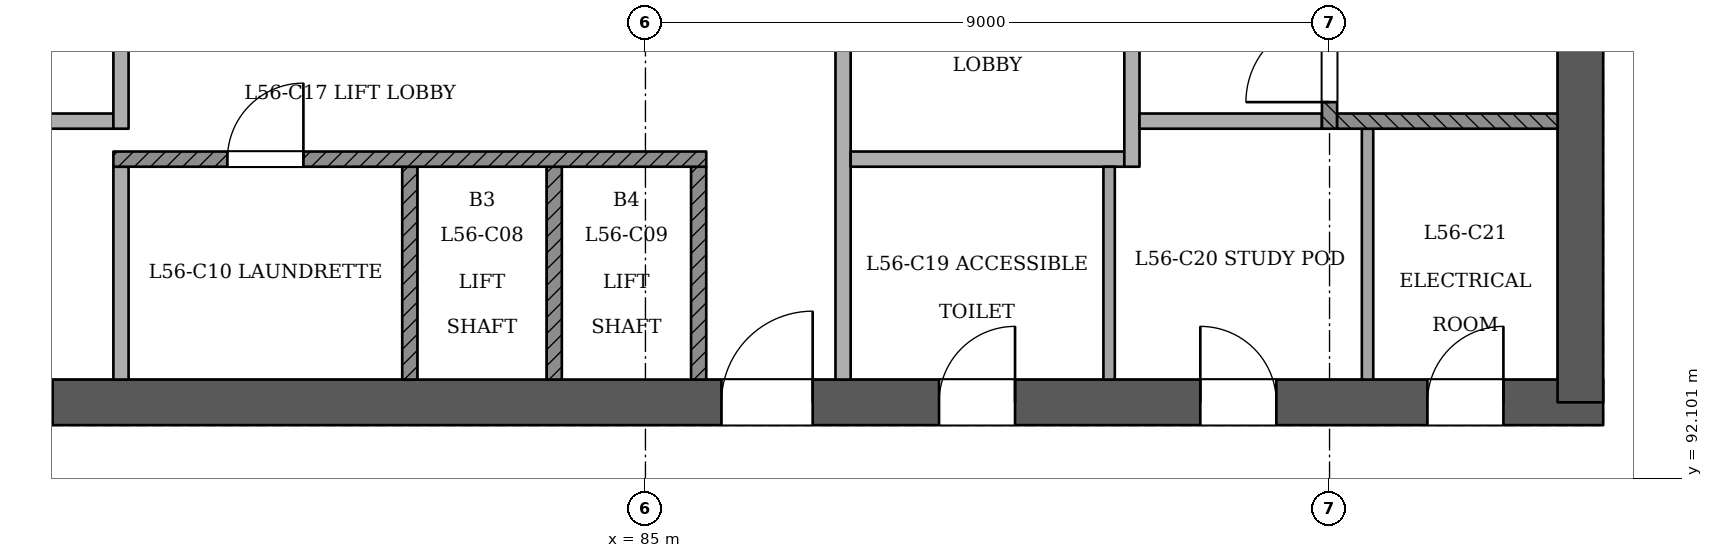
"""IFC4 building model, lengths in metres.
Left out: names, types, materials, properties, quantities, classifications, styles, units other than length and angle.
Written with IfcOpenShell. Run it as: python <this file> out.ifc"""

import sys

from ifc_helpers import new_model, si_unit, direction, frame, frame_2d, origin, place, context, subcontext, project, spatial, rectangle, extrude, element, fill, save


model = new_model("IFC4")
c1 = context("Model", 3, precision=1e-05, world=origin(), true_north=direction((0.0, 1.0)))
c2 = subcontext(c1, "Body", "Model", "MODEL_VIEW")
j1 = project(units=[si_unit("LENGTHUNIT", "METRE"), si_unit("PLANEANGLEUNIT", "RADIAN")], contexts=[c1])
p1 = place(None, origin())
s1 = spatial("IfcSite", under=j1, at=p1, CompositionType="ELEMENT")
p2 = place(p1, origin())
s2 = spatial("IfcBuilding", under=s1, at=p2, CompositionType="ELEMENT")
p3 = place(p2, frame((0.0, 0.0, 219.4)))
s3 = spatial("IfcBuildingStorey", under=s2, at=p3, CompositionType="ELEMENT", Elevation=219.4)
p4 = place(p3, frame((72.7, 93.1, 0.0), z_axis=(0.0, 0.0, 1.0), x_axis=(1.0, 0.0, 0.0)))
e1 = element("IfcWall", 1, at=p4, inside=s3, PredefinedType="SHEAR", context=c2, shape_type="SweptSolid", body=[
    extrude(rectangle(XDim=24.9, YDim=0.6, at=frame_2d((12.45, 0.0))), origin(), (0.0, 0.0, 1.0), 3.6),
])
p5 = place(p4, frame((1.1, 0.0, 0.0)))
e2 = element("IfcOpeningElement", 2, at=p5, cuts=e1, PredefinedType="OPENING", context=c2, shape_type="SweptSolid", body=[
    extrude(rectangle(XDim=1.2, YDim=2.1, at=frame_2d((0.6, 1.05))), frame((0.0, 0.311, 0.0), z_axis=(0.0, -1.0, 0.0), x_axis=(1.0, 0.0, 0.0)), (0.0, 0.0, 1.0), 0.621),
])
p6 = place(p4, frame((3.3, 0.0, 0.0)))
e3 = element("IfcOpeningElement", 3, at=p6, cuts=e1, PredefinedType="OPENING", context=c2, shape_type="SweptSolid", body=[
    extrude(rectangle(XDim=1.2, YDim=2.1, at=frame_2d((0.6, 1.05))), frame((0.0, 0.311, 0.0), z_axis=(0.0, -1.0, 0.0), x_axis=(1.0, 0.0, 0.0)), (0.0, 0.0, 1.0), 0.621),
])
p7 = place(p4, frame((13.3, 0.0, 0.0)))
e4 = element("IfcOpeningElement", 4, at=p7, cuts=e1, PredefinedType="OPENING", context=c2, shape_type="SweptSolid", body=[
    extrude(rectangle(XDim=1.2, YDim=2.1, at=frame_2d((0.6, 1.05))), frame((0.0, 0.311, 0.0), z_axis=(0.0, -1.0, 0.0), x_axis=(1.0, 0.0, 0.0)), (0.0, 0.0, 1.0), 0.621),
])
p8 = place(p4, frame((16.163, 0.0, 0.0)))
e5 = element("IfcOpeningElement", 5, at=p8, cuts=e1, PredefinedType="OPENING", context=c2, shape_type="SweptSolid", body=[
    extrude(rectangle(XDim=1.0, YDim=2.1, at=frame_2d((0.5, 1.05))), frame((0.0, 0.311, 0.0), z_axis=(0.0, -1.0, 0.0), x_axis=(1.0, 0.0, 0.0)), (0.0, 0.0, 1.0), 0.621),
])
p9 = place(p4, frame((19.6, 0.0, 0.0)))
e6 = element("IfcOpeningElement", 6, at=p9, cuts=e1, PredefinedType="OPENING", context=c2, shape_type="SweptSolid", body=[
    extrude(rectangle(XDim=1.0, YDim=2.1, at=frame_2d((0.5, 1.05))), frame((0.0, 0.311, 0.0), z_axis=(0.0, -1.0, 0.0), x_axis=(1.0, 0.0, 0.0)), (0.0, 0.0, 1.0), 0.621),
])
p10 = place(p4, frame((22.587, 0.0, 0.0)))
e7 = element("IfcOpeningElement", 7, at=p10, cuts=e1, PredefinedType="OPENING", context=c2, shape_type="SweptSolid", body=[
    extrude(rectangle(XDim=1.0, YDim=2.1, at=frame_2d((0.5, 1.05))), frame((0.0, 0.311, 0.0), z_axis=(0.0, -1.0, 0.0), x_axis=(1.0, 0.0, 0.0)), (0.0, 0.0, 1.0), 0.621),
])
p11 = place(p3, frame((97.3, 93.1, 0.0), z_axis=(0.0, 0.0, 1.0), x_axis=(0.0, 1.0, 0.0)))
e8 = element("IfcWall", 8, at=p11, inside=s3, PredefinedType="SHEAR", context=c2, shape_type="SweptSolid", body=[
    extrude(rectangle(XDim=10.9, YDim=0.6, at=frame_2d((5.45, 0.0))), origin(), (0.0, 0.0, 1.0), 3.6),
])
p12 = place(p3, frame((78.1, 93.4, 0.0), z_axis=(0.0, 0.0, 1.0), x_axis=(0.0, 1.0, 0.0)))
e9 = element("IfcWall", 9, at=p12, inside=s3, PredefinedType="PARTITIONING", context=c2, shape_type="SweptSolid", body=[
    extrude(rectangle(XDim=2.8, YDim=0.2, at=frame_2d((1.4, 0.0))), origin(), (0.0, 0.0, 1.0), 3.2),
])
for number, where, z_axis, x_axis in (
    (10, (81.9, 93.4, 0.0), (0.0, 0.0, 1.0), (0.0, 1.0, 0.0)),
    (11, (83.8, 93.4, 0.0), (0.0, 0.0, 1.0), (0.0, 1.0, 0.0)),
    (12, (85.7, 93.4, 0.0), (0.0, 0.0, 1.0), (0.0, 1.0, 0.0)),
):
    element("IfcWall", number, at=place(p3, frame(where, z_axis=z_axis, x_axis=x_axis)), inside=s3, PredefinedType="SOLIDWALL", context=c2, shape_type="SweptSolid", body=[
        extrude(rectangle(XDim=2.8, YDim=0.2, at=frame_2d((1.4, 0.0))), origin(), (0.0, 0.0, 1.0), 3.2),
    ])
p13 = place(p3, frame((87.6, 93.4, 0.0), z_axis=(0.0, 0.0, 1.0), x_axis=(0.0, 1.0, 0.0)))
e13 = element("IfcWall", 13, at=p13, inside=s3, PredefinedType="PARTITIONING", context=c2, shape_type="SweptSolid", body=[
    extrude(rectangle(XDim=7.0, YDim=0.2, at=frame_2d((3.5, 0.0))), origin(), (0.0, 0.0, 1.0), 3.2),
])
p14 = place(p13, frame((4.45, 0.0, 0.0)))
e14 = element("IfcOpeningElement", 14, at=p14, cuts=e13, PredefinedType="OPENING", context=c2, shape_type="SweptSolid", body=[
    extrude(rectangle(XDim=1.1, YDim=2.1, at=frame_2d((0.55, 1.05))), frame((0.0, 0.11, 0.0), z_axis=(0.0, -1.0, 0.0), x_axis=(1.0, 0.0, 0.0)), (0.0, 0.0, 1.0), 0.221),
])
p15 = place(p3, frame((91.1, 93.4, 0.0), z_axis=(0.0, 0.0, 1.0), x_axis=(0.0, 1.0, 0.0)))
e15 = element("IfcWall", 15, at=p15, inside=s3, PredefinedType="PARTITIONING", context=c2, shape_type="SweptSolid", body=[
    extrude(rectangle(XDim=2.8, YDim=0.15, at=frame_2d((1.4, 0.0))), origin(), (0.0, 0.0, 1.0), 3.2),
])
p16 = place(p3, frame((94.5, 93.4, 0.0), z_axis=(0.0, 0.0, 1.0), x_axis=(0.0, 1.0, 0.0)))
e16 = element("IfcWall", 16, at=p16, inside=s3, PredefinedType="PARTITIONING", context=c2, shape_type="SweptSolid", body=[
    extrude(rectangle(XDim=3.3, YDim=0.15, at=frame_2d((1.65, 0.0))), origin(), (0.0, 0.0, 1.0), 3.2),
])
p17 = place(p3, frame((78.0, 96.3, 0.0), z_axis=(0.0, 0.0, 1.0), x_axis=(1.0, 0.0, 0.0)))
e17 = element("IfcWall", 17, at=p17, inside=s3, PredefinedType="SOLIDWALL", context=c2, shape_type="SweptSolid", body=[
    extrude(rectangle(XDim=7.8, YDim=0.2, at=frame_2d((3.9, 0.0))), origin(), (0.0, 0.0, 1.0), 3.2),
])
p18 = place(p17, frame((1.5, 0.0, 0.0)))
e18 = element("IfcOpeningElement", 18, at=p18, cuts=e17, PredefinedType="OPENING", context=c2, shape_type="SweptSolid", body=[
    extrude(rectangle(XDim=1.0, YDim=2.1, at=frame_2d((0.5, 1.05))), frame((0.0, 0.11, 0.0), z_axis=(0.0, -1.0, 0.0), x_axis=(1.0, 0.0, 0.0)), (0.0, 0.0, 1.0), 0.221),
])
p19 = place(p3, frame((87.7, 96.3, 0.0), z_axis=(0.0, 0.0, 1.0), x_axis=(1.0, 0.0, 0.0)))
e19 = element("IfcWall", 19, at=p19, inside=s3, PredefinedType="PARTITIONING", context=c2, shape_type="SweptSolid", body=[
    extrude(rectangle(XDim=3.6, YDim=0.2, at=frame_2d((1.8, 0.0))), origin(), (0.0, 0.0, 1.0), 3.2),
])
p20 = place(p3, frame((91.4, 96.2, 0.0), z_axis=(0.0, 0.0, 1.0), x_axis=(0.0, 1.0, 0.0)))
e20 = element("IfcWall", 20, at=p20, inside=s3, PredefinedType="PARTITIONING", context=c2, shape_type="SweptSolid", body=[
    extrude(rectangle(XDim=4.2, YDim=0.2, at=frame_2d((2.1, 0.0))), origin(), (0.0, 0.0, 1.0), 3.2),
])
p21 = place(p20, frame((2.45, 0.0, 0.0)))
e21 = element("IfcOpeningElement", 21, at=p21, cuts=e20, PredefinedType="OPENING", context=c2, shape_type="SweptSolid", body=[
    extrude(rectangle(XDim=1.1, YDim=2.1, at=frame_2d((0.55, 1.05))), frame((0.0, 0.11, 0.0), z_axis=(0.0, -1.0, 0.0), x_axis=(1.0, 0.0, 0.0)), (0.0, 0.0, 1.0), 0.221),
])
p22 = place(p3, frame((76.1, 96.8, 0.0), z_axis=(0.0, 0.0, 1.0), x_axis=(1.0, 0.0, 0.0)))
e22 = element("IfcWall", 22, at=p22, inside=s3, PredefinedType="PARTITIONING", context=c2, shape_type="SweptSolid", body=[
    extrude(rectangle(XDim=1.9, YDim=0.2, at=frame_2d((0.95, 0.0))), origin(), (0.0, 0.0, 1.0), 3.2),
])
p23 = place(p3, frame((78.1, 96.7, 0.0), z_axis=(0.0, 0.0, 1.0), x_axis=(0.0, 1.0, 0.0)))
e23 = element("IfcWall", 23, at=p23, inside=s3, PredefinedType="PARTITIONING", context=c2, shape_type="SweptSolid", body=[
    extrude(rectangle(XDim=3.7, YDim=0.2, at=frame_2d((1.85, 0.0))), origin(), (0.0, 0.0, 1.0), 3.2),
])
p24 = place(p23, frame((1.95, 0.0, 0.0)))
e24 = element("IfcOpeningElement", 24, at=p24, cuts=e23, PredefinedType="OPENING", context=c2, shape_type="SweptSolid", body=[
    extrude(rectangle(XDim=1.1, YDim=2.1, at=frame_2d((0.55, 1.05))), frame((0.0, 0.11, 0.0), z_axis=(0.0, -1.0, 0.0), x_axis=(1.0, 0.0, 0.0)), (0.0, 0.0, 1.0), 0.221),
])
p25 = place(p3, frame((91.5, 96.8, 0.0), z_axis=(0.0, 0.0, 1.0), x_axis=(1.0, 0.0, 0.0)))
e25 = element("IfcWall", 25, at=p25, inside=s3, PredefinedType="PARTITIONING", context=c2, shape_type="SweptSolid", body=[
    extrude(rectangle(XDim=2.4, YDim=0.2, at=frame_2d((1.2, 0.0))), origin(), (0.0, 0.0, 1.0), 3.2),
])
p26 = place(p3, frame((94.0, 96.7, 0.0), z_axis=(0.0, 0.0, 1.0), x_axis=(0.0, 1.0, 0.0)))
e26 = element("IfcWall", 26, at=p26, inside=s3, PredefinedType="SOLIDWALL", context=c2, shape_type="SweptSolid", body=[
    extrude(rectangle(XDim=3.7, YDim=0.2, at=frame_2d((1.85, 0.0))), origin(), (0.0, 0.0, 1.0), 3.2),
])
p27 = place(p26, frame((0.35, 0.0, 0.0)))
e27 = element("IfcOpeningElement", 27, at=p27, cuts=e26, PredefinedType="OPENING", context=c2, shape_type="SweptSolid", body=[
    extrude(rectangle(XDim=1.1, YDim=2.1, at=frame_2d((0.55, 1.05))), frame((0.0, 0.11, 0.0), z_axis=(0.0, -1.0, 0.0), x_axis=(1.0, 0.0, 0.0)), (0.0, 0.0, 1.0), 0.221),
])
p28 = place(p3, frame((94.1, 96.8, 0.0), z_axis=(0.0, 0.0, 1.0), x_axis=(1.0, 0.0, 0.0)))
e28 = element("IfcWall", 28, at=p28, inside=s3, PredefinedType="SOLIDWALL", context=c2, shape_type="SweptSolid", body=[
    extrude(rectangle(XDim=2.9, YDim=0.2, at=frame_2d((1.45, 0.0))), origin(), (0.0, 0.0, 1.0), 3.2),
])
p29 = place(p27, origin())
e29 = element("IfcDoor", 29, at=p29, inside=s3, OperationType="SINGLE_SWING_LEFT", PredefinedType="NOTDEFINED", context=c2, shape_type="SweptSolid", body=[
    extrude(rectangle(XDim=1.1, YDim=2.1, at=frame_2d((0.55, 1.05))), frame((0.0, 0.025, 0.0), z_axis=(0.0, -1.0, 0.0), x_axis=(1.0, 0.0, 0.0)), (0.0, 0.0, 1.0), 0.05),
])
fill(e27, e29)
p30 = place(p6, origin())
e30 = element("IfcDoor", 30, at=p30, inside=s3, OperationType="SINGLE_SWING_LEFT", PredefinedType="NOTDEFINED", context=c2, shape_type="SweptSolid", body=[
    extrude(rectangle(XDim=1.2, YDim=2.1, at=frame_2d((0.6, 1.05))), frame((0.0, 0.025, 0.0), z_axis=(0.0, -1.0, 0.0), x_axis=(1.0, 0.0, 0.0)), (0.0, 0.0, 1.0), 0.05),
])
fill(e3, e30)
p31 = place(p7, origin())
e31 = element("IfcDoor", 31, at=p31, inside=s3, OperationType="SINGLE_SWING_RIGHT", PredefinedType="NOTDEFINED", context=c2, shape_type="SweptSolid", body=[
    extrude(rectangle(XDim=1.2, YDim=2.1, at=frame_2d((0.6, 1.05))), frame((0.0, 0.025, 0.0), z_axis=(0.0, -1.0, 0.0), x_axis=(1.0, 0.0, 0.0)), (0.0, 0.0, 1.0), 0.05),
])
fill(e4, e31)
p32 = place(p8, origin())
e32 = element("IfcDoor", 32, at=p32, inside=s3, OperationType="SINGLE_SWING_RIGHT", PredefinedType="NOTDEFINED", context=c2, shape_type="SweptSolid", body=[
    extrude(rectangle(XDim=1.0, YDim=2.1, at=frame_2d((0.5, 1.05))), frame((0.0, 0.025, 0.0), z_axis=(0.0, -1.0, 0.0), x_axis=(1.0, 0.0, 0.0)), (0.0, 0.0, 1.0), 0.05),
])
fill(e5, e32)
p33 = place(p9, origin())
e33 = element("IfcDoor", 33, at=p33, inside=s3, OperationType="SINGLE_SWING_LEFT", PredefinedType="NOTDEFINED", context=c2, shape_type="SweptSolid", body=[
    extrude(rectangle(XDim=1.0, YDim=2.1, at=frame_2d((0.5, 1.05))), frame((0.0, 0.025, 0.0), z_axis=(0.0, -1.0, 0.0), x_axis=(1.0, 0.0, 0.0)), (0.0, 0.0, 1.0), 0.05),
])
fill(e6, e33)
p34 = place(p10, origin())
e34 = element("IfcDoor", 34, at=p34, inside=s3, OperationType="SINGLE_SWING_RIGHT", PredefinedType="NOTDEFINED", context=c2, shape_type="SweptSolid", body=[
    extrude(rectangle(XDim=1.0, YDim=2.1, at=frame_2d((0.5, 1.05))), frame((0.0, 0.025, 0.0), z_axis=(0.0, -1.0, 0.0), x_axis=(1.0, 0.0, 0.0)), (0.0, 0.0, 1.0), 0.05),
])
fill(e7, e34)
p35 = place(p18, origin())
e35 = element("IfcDoor", 35, at=p35, inside=s3, OperationType="SINGLE_SWING_RIGHT", PredefinedType="NOTDEFINED", context=c2, shape_type="SweptSolid", body=[
    extrude(rectangle(XDim=1.0, YDim=2.1, at=frame_2d((0.5, 1.05))), frame((0.0, 0.025, 0.0), z_axis=(0.0, -1.0, 0.0), x_axis=(1.0, 0.0, 0.0)), (0.0, 0.0, 1.0), 0.05),
])
fill(e18, e35)
save(model, sys.argv[1])
